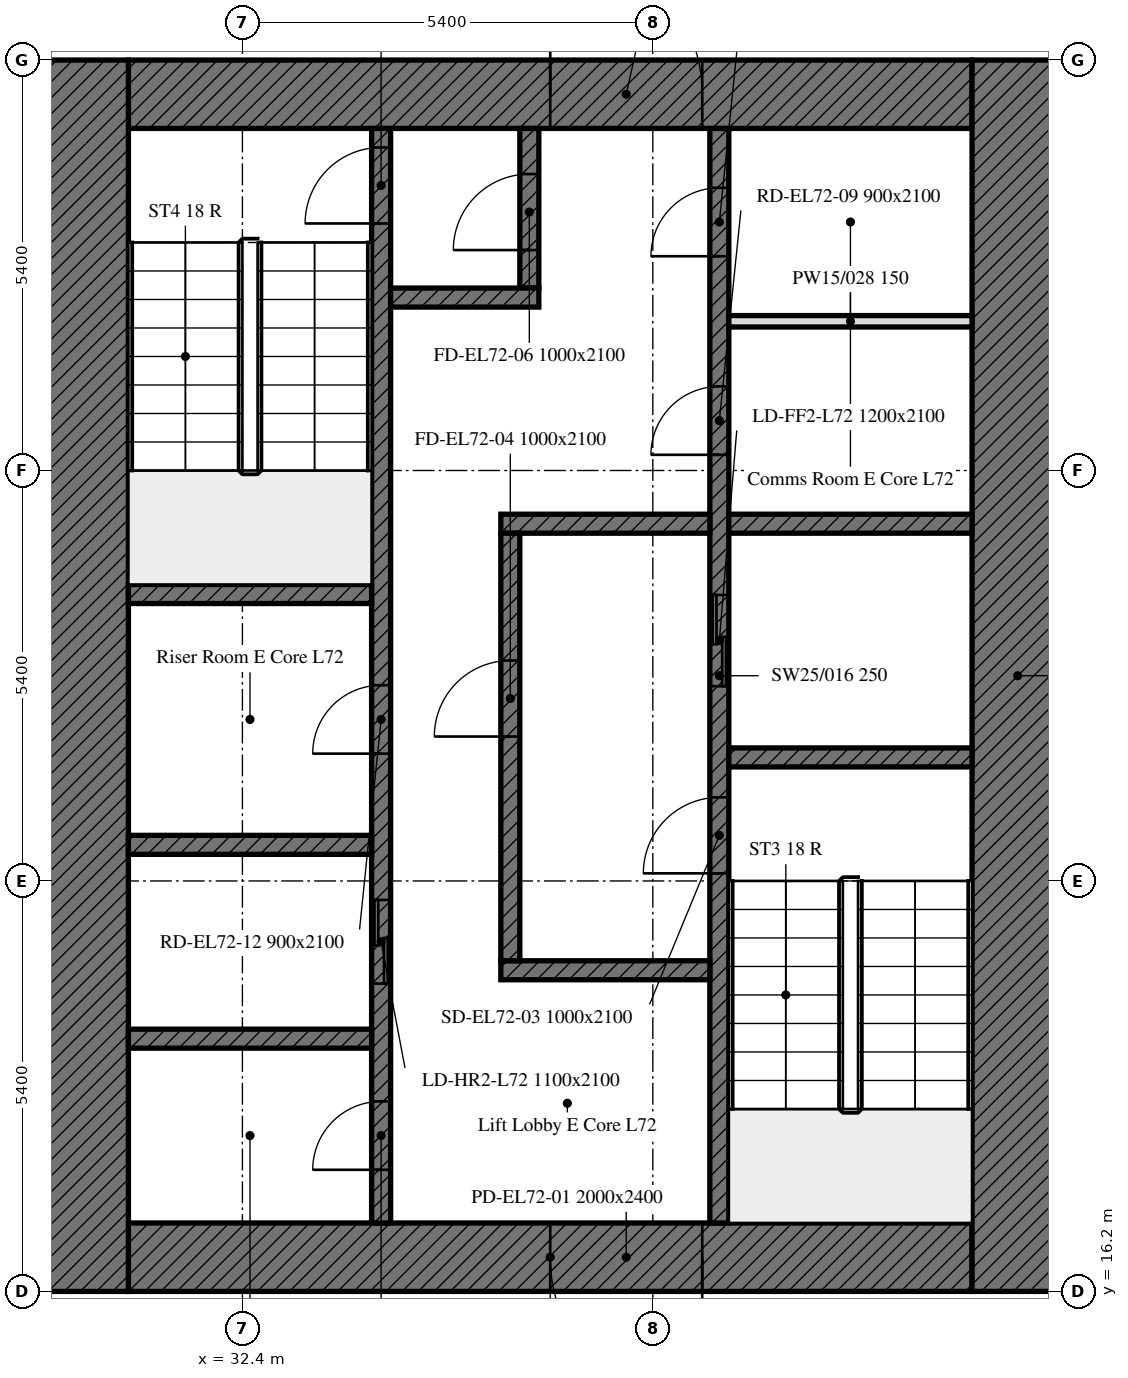
"""IFC4 building model, lengths in metres.
Left out: names, types, materials, properties, quantities, classifications, styles, units other than length and angle.
Written with IfcOpenShell. Run it as: python <this file> out.ifc"""

import sys

from ifc_helpers import new_model, si_unit, direction, frame, frame_2d, origin, place, context, subcontext, project, spatial, rectangle, extrude, element, fill, save


model = new_model("IFC4")
c1 = context("Model", 3, precision=1e-05, world=origin(), true_north=direction((0.0, 1.0)))
c2 = subcontext(c1, "Body", "Model", "MODEL_VIEW")
j1 = project(units=[si_unit("LENGTHUNIT", "METRE"), si_unit("PLANEANGLEUNIT", "RADIAN")], contexts=[c1])
p1 = place(None, origin())
s1 = spatial("IfcSite", under=j1, at=p1, CompositionType="ELEMENT")
p2 = place(p1, origin())
s2 = spatial("IfcBuilding", under=s1, at=p2, CompositionType="ELEMENT")
p3 = place(p2, frame((0.0, 0.0, 291.7)))
s3 = spatial("IfcBuildingStorey", under=s2, at=p3, CompositionType="ELEMENT", Elevation=291.7)
p4 = place(p3, frame((42.0, 16.65, 0.0), z_axis=(0.0, 0.0, 1.0), x_axis=(-1.0, 0.0, 0.0)))
e1 = element("IfcWall", 1, at=p4, inside=s3, PredefinedType="SOLIDWALL", context=c2, shape_type="SweptSolid", body=[
    extrude(rectangle(XDim=11.1, YDim=0.9, at=frame_2d((5.55, 0.0))), origin(), (0.0, 0.0, 1.0), 3.0),
])
p5 = place(p4, frame((3.55, 0.0, 0.0)))
e2 = element("IfcOpeningElement", 2, at=p5, cuts=e1, PredefinedType="OPENING", context=c2, shape_type="SweptSolid", body=[
    extrude(rectangle(XDim=2.0, YDim=2.4, at=frame_2d((1.0, 1.2))), frame((0.0, 0.45, 0.0), z_axis=(0.0, -1.0, 0.0), x_axis=(1.0, 0.0, 0.0)), (0.0, 0.0, 1.0), 0.9),
])
p6 = place(p3, frame((30.9, 31.95, 0.0), z_axis=(0.0, 0.0, 1.0), x_axis=(1.0, 0.0, 0.0)))
e3 = element("IfcWall", 3, at=p6, inside=s3, PredefinedType="SOLIDWALL", context=c2, shape_type="SweptSolid", body=[
    extrude(rectangle(XDim=11.1, YDim=0.9, at=frame_2d((5.55, 0.0))), origin(), (0.0, 0.0, 1.0), 3.0),
])
p7 = place(p6, frame((5.55, 0.0, 0.0)))
e4 = element("IfcOpeningElement", 4, at=p7, cuts=e3, PredefinedType="OPENING", context=c2, shape_type="SweptSolid", body=[
    extrude(rectangle(XDim=2.0, YDim=2.4, at=frame_2d((1.0, 1.2))), frame((0.0, 0.45, 0.0), z_axis=(0.0, -1.0, 0.0), x_axis=(1.0, 0.0, 0.0)), (0.0, 0.0, 1.0), 0.9),
])
for number, where, z_axis, x_axis in (
    (5, (42.6, 32.4, 0.0), (0.0, 0.0, 1.0), (0.0, -1.0, 0.0)),
    (6, (30.3, 16.2, 0.0), (0.0, 0.0, 1.0), (0.0, 1.0, 0.0)),
):
    element("IfcWall", number, at=place(p3, frame(where, z_axis=z_axis, x_axis=x_axis)), inside=s3, PredefinedType="SOLIDWALL", context=c2, shape_type="SweptSolid", body=[
        extrude(rectangle(XDim=16.2, YDim=1.2, at=frame_2d((8.1, 0.0))), origin(), (0.0, 0.0, 1.0), 3.0),
    ])
p8 = place(p3, frame((38.675, 17.1, 0.0), z_axis=(0.0, 0.0, 1.0), x_axis=(0.0, 1.0, 0.0)))
e7 = element("IfcWall", 7, at=p8, inside=s3, PredefinedType="SOLIDWALL", context=c2, shape_type="SweptSolid", body=[
    extrude(rectangle(XDim=14.4, YDim=0.25, at=frame_2d((7.2, 0.0))), origin(), (0.0, 0.0, 1.0), 3.0),
])
p9 = place(p8, frame((4.6, 0.0, 0.0)))
e8 = element("IfcOpeningElement", 8, at=p9, cuts=e7, PredefinedType="OPENING", context=c2, shape_type="SweptSolid", body=[
    extrude(rectangle(XDim=1.0, YDim=2.1, at=frame_2d((0.5, 1.05))), frame((0.0, 0.125, 0.0), z_axis=(0.0, -1.0, 0.0), x_axis=(1.0, 0.0, 0.0)), (0.0, 0.0, 1.0), 0.25),
])
p10 = place(p8, frame((7.062, 0.0, 0.0)))
e9 = element("IfcOpeningElement", 9, at=p10, cuts=e7, PredefinedType="OPENING", context=c2, shape_type="SweptSolid", body=[
    extrude(rectangle(XDim=1.2, YDim=2.1, at=frame_2d((0.6, 1.05))), frame((0.0, 0.125, 0.0), z_axis=(0.0, -1.0, 0.0), x_axis=(1.0, 0.0, 0.0)), (0.0, 0.0, 1.0), 0.25),
])
p11 = place(p8, frame((10.106, 0.0, 0.0)))
e10 = element("IfcOpeningElement", 10, at=p11, cuts=e7, PredefinedType="OPENING", context=c2, shape_type="SweptSolid", body=[
    extrude(rectangle(XDim=0.9, YDim=2.1, at=frame_2d((0.45, 1.05))), frame((0.0, 0.125, 0.0), z_axis=(0.0, -1.0, 0.0), x_axis=(1.0, 0.0, 0.0)), (0.0, 0.0, 1.0), 0.25),
])
p12 = place(p8, frame((12.719, 0.0, 0.0)))
e11 = element("IfcOpeningElement", 11, at=p12, cuts=e7, PredefinedType="OPENING", context=c2, shape_type="SweptSolid", body=[
    extrude(rectangle(XDim=0.9, YDim=2.1, at=frame_2d((0.45, 1.05))), frame((0.0, 0.125, 0.0), z_axis=(0.0, -1.0, 0.0), x_axis=(1.0, 0.0, 0.0)), (0.0, 0.0, 1.0), 0.25),
])
p13 = place(p3, frame((34.225, 17.1, 0.0), z_axis=(0.0, 0.0, 1.0), x_axis=(0.0, 1.0, 0.0)))
e12 = element("IfcWall", 12, at=p13, inside=s3, PredefinedType="SOLIDWALL", context=c2, shape_type="SweptSolid", body=[
    extrude(rectangle(XDim=14.4, YDim=0.25, at=frame_2d((7.2, 0.0))), origin(), (0.0, 0.0, 1.0), 3.0),
])
p14 = place(p13, frame((13.15, 0.0, 0.0)))
e13 = element("IfcOpeningElement", 13, at=p14, cuts=e12, PredefinedType="OPENING", context=c2, shape_type="SweptSolid", body=[
    extrude(rectangle(XDim=1.0, YDim=2.1, at=frame_2d((0.5, 1.05))), frame((0.0, 0.125, 0.0), z_axis=(0.0, -1.0, 0.0), x_axis=(1.0, 0.0, 0.0)), (0.0, 0.0, 1.0), 0.25),
])
p15 = place(p13, frame((3.15, 0.0, 0.0)))
e14 = element("IfcOpeningElement", 14, at=p15, cuts=e12, PredefinedType="OPENING", context=c2, shape_type="SweptSolid", body=[
    extrude(rectangle(XDim=1.1, YDim=2.1, at=frame_2d((0.55, 1.05))), frame((0.0, 0.125, 0.0), z_axis=(0.0, -1.0, 0.0), x_axis=(1.0, 0.0, 0.0)), (0.0, 0.0, 1.0), 0.25),
])
p16 = place(p13, frame((0.7, 0.0, 0.0)))
e15 = element("IfcOpeningElement", 15, at=p16, cuts=e12, PredefinedType="OPENING", context=c2, shape_type="SweptSolid", body=[
    extrude(rectangle(XDim=0.9, YDim=2.1, at=frame_2d((0.45, 1.05))), frame((0.0, 0.125, 0.0), z_axis=(0.0, -1.0, 0.0), x_axis=(1.0, 0.0, 0.0)), (0.0, 0.0, 1.0), 0.25),
])
p17 = place(p13, frame((6.175, 0.0, 0.0)))
e16 = element("IfcOpeningElement", 16, at=p17, cuts=e12, PredefinedType="OPENING", context=c2, shape_type="SweptSolid", body=[
    extrude(rectangle(XDim=0.9, YDim=2.1, at=frame_2d((0.45, 1.05))), frame((0.0, 0.125, 0.0), z_axis=(0.0, -1.0, 0.0), x_axis=(1.0, 0.0, 0.0)), (0.0, 0.0, 1.0), 0.25),
])
p18 = place(p3, frame((38.8, 23.225, 0.0), z_axis=(0.0, 0.0, 1.0), x_axis=(1.0, 0.0, 0.0)))
e17 = element("IfcWall", 17, at=p18, inside=s3, PredefinedType="SOLIDWALL", context=c2, shape_type="SweptSolid", body=[
    extrude(rectangle(XDim=3.2, YDim=0.25, at=frame_2d((1.6, 0.0))), origin(), (0.0, 0.0, 1.0), 3.0),
])
for number, where, z_axis, x_axis in (
    (18, (30.9, 25.375, 0.0), (0.0, 0.0, 1.0), (1.0, 0.0, 0.0)),
    (19, (30.9, 22.075, 0.0), (0.0, 0.0, 1.0), (1.0, 0.0, 0.0)),
):
    element("IfcWall", number, at=place(p3, frame(where, z_axis=z_axis, x_axis=x_axis)), inside=s3, PredefinedType="SOLIDWALL", context=c2, shape_type="SweptSolid", body=[
        extrude(rectangle(XDim=3.2, YDim=0.25, at=frame_2d((1.6, 0.0))), origin(), (0.0, 0.0, 1.0), 3.0),
    ])
p19 = place(p3, frame((38.8, 26.3, 0.0), z_axis=(0.0, 0.0, 1.0), x_axis=(1.0, 0.0, 0.0)))
e20 = element("IfcWall", 20, at=p19, inside=s3, PredefinedType="SOLIDWALL", context=c2, shape_type="SweptSolid", body=[
    extrude(rectangle(XDim=3.2, YDim=0.25, at=frame_2d((1.6, 0.0))), origin(), (0.0, 0.0, 1.0), 3.0),
])
for number, where, z_axis, x_axis in (
    (21, (35.8, 26.3, 0.0), (0.0, 0.0, 1.0), (1.0, 0.0, 0.0)),
    (22, (35.8, 20.425, 0.0), (0.0, 0.0, 1.0), (1.0, 0.0, 0.0)),
):
    element("IfcWall", number, at=place(p3, frame(where, z_axis=z_axis, x_axis=x_axis)), inside=s3, PredefinedType="SOLIDWALL", context=c2, shape_type="SweptSolid", body=[
        extrude(rectangle(XDim=2.75, YDim=0.25, at=frame_2d((1.375, 0.0))), origin(), (0.0, 0.0, 1.0), 3.0),
    ])
p20 = place(p3, frame((36.175, 29.4, 0.0), z_axis=(0.0, 0.0, 1.0), x_axis=(0.0, 1.0, 0.0)))
e23 = element("IfcWall", 23, at=p20, inside=s3, PredefinedType="SOLIDWALL", context=c2, shape_type="SweptSolid", body=[
    extrude(rectangle(XDim=2.1, YDim=0.25, at=frame_2d((1.05, 0.0))), origin(), (0.0, 0.0, 1.0), 3.0),
])
p21 = place(p20, frame((0.5, 0.0, 0.0)))
e24 = element("IfcOpeningElement", 24, at=p21, cuts=e23, PredefinedType="OPENING", context=c2, shape_type="SweptSolid", body=[
    extrude(rectangle(XDim=1.0, YDim=2.1, at=frame_2d((0.5, 1.05))), frame((0.0, 0.125, 0.0), z_axis=(0.0, -1.0, 0.0), x_axis=(1.0, 0.0, 0.0)), (0.0, 0.0, 1.0), 0.25),
])
p22 = place(p3, frame((34.35, 29.275, 0.0), z_axis=(0.0, 0.0, 1.0), x_axis=(1.0, 0.0, 0.0)))
e25 = element("IfcWall", 25, at=p22, inside=s3, PredefinedType="SOLIDWALL", context=c2, shape_type="SweptSolid", body=[
    extrude(rectangle(XDim=1.95, YDim=0.25, at=frame_2d((0.975, 0.0))), origin(), (0.0, 0.0, 1.0), 3.0),
])
p23 = place(p3, frame((35.925, 20.55, 0.0), z_axis=(0.0, 0.0, 1.0), x_axis=(0.0, 1.0, 0.0)))
e26 = element("IfcWall", 26, at=p23, inside=s3, PredefinedType="SOLIDWALL", context=c2, shape_type="SweptSolid", body=[
    extrude(rectangle(XDim=5.625, YDim=0.25, at=frame_2d((2.812, 0.0))), origin(), (0.0, 0.0, 1.0), 3.0),
])
p24 = place(p23, frame((2.95, 0.0, 0.0)))
e27 = element("IfcOpeningElement", 27, at=p24, cuts=e26, PredefinedType="OPENING", context=c2, shape_type="SweptSolid", body=[
    extrude(rectangle(XDim=1.0, YDim=2.1, at=frame_2d((0.5, 1.05))), frame((0.0, 0.125, 0.0), z_axis=(0.0, -1.0, 0.0), x_axis=(1.0, 0.0, 0.0)), (0.0, 0.0, 1.0), 0.25),
])
p25 = place(p3, frame((30.9, 19.525, 0.0), z_axis=(0.0, 0.0, 1.0), x_axis=(1.0, 0.0, 0.0)))
e28 = element("IfcWall", 28, at=p25, inside=s3, PredefinedType="SOLIDWALL", context=c2, shape_type="SweptSolid", body=[
    extrude(rectangle(XDim=3.2, YDim=0.25, at=frame_2d((1.6, 0.0))), origin(), (0.0, 0.0, 1.0), 3.0),
])
p26 = place(p3, frame((38.8, 28.963, 0.0), z_axis=(0.0, 0.0, 1.0), x_axis=(1.0, 0.0, 0.0)))
e29 = element("IfcWall", 29, at=p26, inside=s3, PredefinedType="PARTITIONING", context=c2, shape_type="SweptSolid", body=[
    extrude(rectangle(XDim=3.2, YDim=0.15, at=frame_2d((1.6, 0.0))), origin(), (0.0, 0.0, 1.0), 3.0),
])
p27 = place(p5, origin())
e30 = element("IfcDoor", 30, at=p27, inside=s3, OperationType="DOUBLE_DOOR_SINGLE_SWING", PredefinedType="DOOR", context=c2, shape_type="SweptSolid", body=[
    extrude(rectangle(XDim=2.0, YDim=2.4, at=frame_2d((1.0, 1.2))), frame((0.0, 0.025, 0.0), z_axis=(0.0, -1.0, 0.0), x_axis=(1.0, 0.0, 0.0)), (0.0, 0.0, 1.0), 0.05),
])
fill(e2, e30)
p28 = place(p7, origin())
e31 = element("IfcDoor", 31, at=p28, inside=s3, OperationType="DOUBLE_DOOR_SINGLE_SWING", PredefinedType="DOOR", context=c2, shape_type="SweptSolid", body=[
    extrude(rectangle(XDim=2.0, YDim=2.4, at=frame_2d((1.0, 1.2))), frame((0.0, 0.025, 0.0), z_axis=(0.0, -1.0, 0.0), x_axis=(1.0, 0.0, 0.0)), (0.0, 0.0, 1.0), 0.05),
])
fill(e4, e31)
p29 = place(p9, origin())
e32 = element("IfcDoor", 32, at=p29, inside=s3, OperationType="SINGLE_SWING_LEFT", PredefinedType="DOOR", context=c2, shape_type="SweptSolid", body=[
    extrude(rectangle(XDim=1.0, YDim=2.1, at=frame_2d((0.5, 1.05))), frame((0.0, 0.025, 0.0), z_axis=(0.0, -1.0, 0.0), x_axis=(1.0, 0.0, 0.0)), (0.0, 0.0, 1.0), 0.05),
])
fill(e8, e32)
p30 = place(p24, origin())
e33 = element("IfcDoor", 33, at=p30, inside=s3, OperationType="SINGLE_SWING_LEFT", PredefinedType="DOOR", context=c2, shape_type="SweptSolid", body=[
    extrude(rectangle(XDim=1.0, YDim=2.1, at=frame_2d((0.5, 1.05))), frame((0.0, 0.025, 0.0), z_axis=(0.0, -1.0, 0.0), x_axis=(1.0, 0.0, 0.0)), (0.0, 0.0, 1.0), 0.05),
])
fill(e27, e33)
p31 = place(p14, origin())
e34 = element("IfcDoor", 34, at=p31, inside=s3, OperationType="SINGLE_SWING_LEFT", PredefinedType="DOOR", context=c2, shape_type="SweptSolid", body=[
    extrude(rectangle(XDim=1.0, YDim=2.1, at=frame_2d((0.5, 1.05))), frame((0.0, 0.025, 0.0), z_axis=(0.0, -1.0, 0.0), x_axis=(1.0, 0.0, 0.0)), (0.0, 0.0, 1.0), 0.05),
])
fill(e13, e34)
p32 = place(p21, origin())
e35 = element("IfcDoor", 35, at=p32, inside=s3, OperationType="SINGLE_SWING_LEFT", PredefinedType="DOOR", context=c2, shape_type="SweptSolid", body=[
    extrude(rectangle(XDim=1.0, YDim=2.1, at=frame_2d((0.5, 1.05))), frame((0.0, 0.025, 0.0), z_axis=(0.0, -1.0, 0.0), x_axis=(1.0, 0.0, 0.0)), (0.0, 0.0, 1.0), 0.05),
])
fill(e24, e35)
p33 = place(p10, origin())
e36 = element("IfcDoor", 36, at=p33, inside=s3, OperationType="DOUBLE_DOOR_SLIDING", PredefinedType="DOOR", context=c2, shape_type="SweptSolid", body=[
    extrude(rectangle(XDim=1.2, YDim=2.1, at=frame_2d((0.6, 1.05))), frame((0.0, 0.025, 0.0), z_axis=(0.0, -1.0, 0.0), x_axis=(1.0, 0.0, 0.0)), (0.0, 0.0, 1.0), 0.05),
])
fill(e9, e36)
p34 = place(p15, origin())
e37 = element("IfcDoor", 37, at=p34, inside=s3, OperationType="DOUBLE_DOOR_SLIDING", PredefinedType="DOOR", context=c2, shape_type="SweptSolid", body=[
    extrude(rectangle(XDim=1.1, YDim=2.1, at=frame_2d((0.55, 1.05))), frame((0.0, 0.025, 0.0), z_axis=(0.0, -1.0, 0.0), x_axis=(1.0, 0.0, 0.0)), (0.0, 0.0, 1.0), 0.05),
])
fill(e14, e37)
p35 = place(p11, origin())
e38 = element("IfcDoor", 38, at=p35, inside=s3, OperationType="SINGLE_SWING_LEFT", PredefinedType="DOOR", context=c2, shape_type="SweptSolid", body=[
    extrude(rectangle(XDim=0.9, YDim=2.1, at=frame_2d((0.45, 1.05))), frame((0.0, 0.025, 0.0), z_axis=(0.0, -1.0, 0.0), x_axis=(1.0, 0.0, 0.0)), (0.0, 0.0, 1.0), 0.05),
])
fill(e10, e38)
p36 = place(p12, origin())
e39 = element("IfcDoor", 39, at=p36, inside=s3, OperationType="SINGLE_SWING_LEFT", PredefinedType="DOOR", context=c2, shape_type="SweptSolid", body=[
    extrude(rectangle(XDim=0.9, YDim=2.1, at=frame_2d((0.45, 1.05))), frame((0.0, 0.025, 0.0), z_axis=(0.0, -1.0, 0.0), x_axis=(1.0, 0.0, 0.0)), (0.0, 0.0, 1.0), 0.05),
])
fill(e11, e39)
p37 = place(p16, origin())
e40 = element("IfcDoor", 40, at=p37, inside=s3, OperationType="SINGLE_SWING_LEFT", PredefinedType="DOOR", context=c2, shape_type="SweptSolid", body=[
    extrude(rectangle(XDim=0.9, YDim=2.1, at=frame_2d((0.45, 1.05))), frame((0.0, 0.025, 0.0), z_axis=(0.0, -1.0, 0.0), x_axis=(1.0, 0.0, 0.0)), (0.0, 0.0, 1.0), 0.05),
])
fill(e15, e40)
p38 = place(p17, origin())
e41 = element("IfcDoor", 41, at=p38, inside=s3, OperationType="SINGLE_SWING_LEFT", PredefinedType="DOOR", context=c2, shape_type="SweptSolid", body=[
    extrude(rectangle(XDim=0.9, YDim=2.1, at=frame_2d((0.45, 1.05))), frame((0.0, 0.025, 0.0), z_axis=(0.0, -1.0, 0.0), x_axis=(1.0, 0.0, 0.0)), (0.0, 0.0, 1.0), 0.05),
])
fill(e16, e41)
save(model, sys.argv[1])
